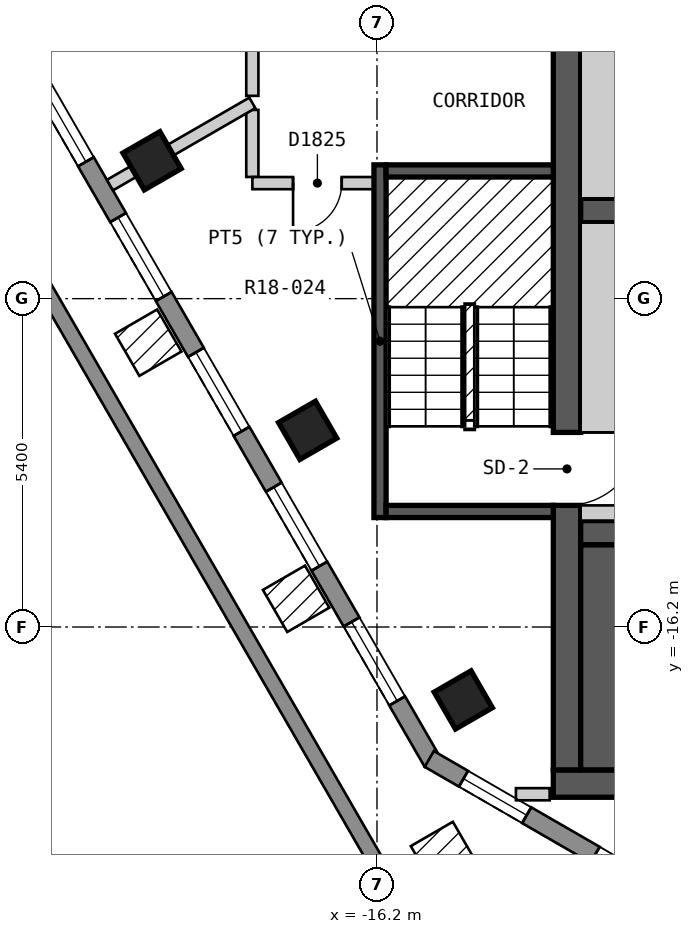
"""IFC4 building model, lengths in metres.
Left out: names, types, materials, properties, quantities, classifications, styles, units other than length and angle.
Written with IfcOpenShell. Run it as: python <this file> out.ifc"""

import sys

from ifc_helpers import new_model, si_unit, direction, frame, frame_2d, origin, origin_2d, place, context, subcontext, project, spatial, polyline, rectangle, outline, extrude, element, fill, save


model = new_model("IFC4")
c1 = context("Model", 3, precision=1e-05, world=origin(), true_north=direction((0.0, 1.0)))
c2 = subcontext(c1, "Body", "Model", "MODEL_VIEW")
j1 = project(units=[si_unit("LENGTHUNIT", "METRE"), si_unit("PLANEANGLEUNIT", "RADIAN")], contexts=[c1])
p1 = place(None, origin())
s1 = spatial("IfcSite", under=j1, at=p1, CompositionType="ELEMENT")
p2 = place(p1, origin())
s2 = spatial("IfcBuilding", under=s1, at=p2, CompositionType="ELEMENT")
p3 = place(p2, frame((0.0, 0.0, 202.8)))
s3 = spatial("IfcBuildingStorey", under=s2, at=p3, CompositionType="ELEMENT", Elevation=202.8)
for number, where, z_axis, x_axis in (
    (1, (-19.899, -8.533, 0.0), (0.0, 0.0, 1.0), (0.5, -0.866, 0.0)),
    (2, (-17.34, -12.966, 0.0), (0.0, 0.0, 1.0), (0.5, -0.866, 0.0)),
    (3, (-14.781, -17.399, 0.0), (0.0, 0.0, 1.0), (0.5, -0.866, 0.0)),
):
    element("IfcColumn", number, at=place(p3, frame(where, z_axis=z_axis, x_axis=x_axis)), inside=s3, PredefinedType="COLUMN", context=c2, shape_type="SweptSolid", body=[
        extrude(rectangle(XDim=0.7, YDim=0.7, at=origin_2d()), origin(), (0.0, 0.0, 1.0), 3.0),
    ])
p4 = place(p3, frame((-13.3, -18.775, 0.0), z_axis=(0.0, 0.0, 1.0), x_axis=(1.0, 0.0, 0.0)))
e4 = element("IfcWall", 4, at=p4, inside=s3, PredefinedType="SHEAR", context=c2, shape_type="SweptSolid", body=[
    extrude(rectangle(XDim=26.6, YDim=0.45, at=frame_2d((13.3, 0.0))), origin(), (0.0, 0.0, 1.0), 2.7),
])
p5 = place(p4, frame((9.8, 0.0, 0.0)))
e5 = element("IfcOpeningElement", 5, at=p5, cuts=e4, PredefinedType="OPENING", context=c2, shape_type="SweptSolid", body=[
    extrude(rectangle(XDim=0.9, YDim=2.1, at=frame_2d((0.45, 1.05))), frame((0.0, 0.235, 0.0), z_axis=(0.0, -1.0, 0.0), x_axis=(1.0, 0.0, 0.0)), (0.0, 0.0, 1.0), 0.47),
])
p6 = place(p3, frame((-13.075, -18.55, 0.0), z_axis=(0.0, 0.0, 1.0), x_axis=(0.0, 1.0, 0.0)))
e6 = element("IfcWall", 6, at=p6, inside=s3, PredefinedType="SHEAR", context=c2, shape_type="SweptSolid", body=[
    extrude(rectangle(XDim=13.1, YDim=0.45, at=frame_2d((6.55, 0.0))), origin(), (0.0, 0.0, 1.0), 2.7),
])
p7 = place(p6, frame((4.35, 0.0, 0.0)))
e7 = element("IfcOpeningElement", 7, at=p7, cuts=e6, PredefinedType="OPENING", context=c2, shape_type="SweptSolid", body=[
    extrude(rectangle(XDim=1.2, YDim=2.1, at=frame_2d((0.6, 1.05))), frame((0.0, 0.235, 0.0), z_axis=(0.0, -1.0, 0.0), x_axis=(1.0, 0.0, 0.0)), (0.0, 0.0, 1.0), 0.47),
])
p8 = place(p3, frame((-12.85, -14.65, 0.0), z_axis=(0.0, 0.0, 1.0), x_axis=(1.0, 0.0, 0.0)))
e8 = element("IfcWall", 8, at=p8, inside=s3, PredefinedType="SHEAR", context=c2, shape_type="SweptSolid", body=[
    extrude(rectangle(XDim=25.7, YDim=0.4, at=frame_2d((12.85, 0.0))), origin(), (0.0, 0.0, 1.0), 2.7),
])
p9 = place(p8, frame((2.05, 0.0, 0.0), z_axis=(0.0, 0.0, 1.0), x_axis=(-1.0, 0.0, 0.0)))
e9 = element("IfcOpeningElement", 9, at=p9, cuts=e8, PredefinedType="OPENING", context=c2, shape_type="SweptSolid", body=[
    extrude(rectangle(XDim=1.2, YDim=2.1, at=frame_2d((0.6, 1.05))), frame((0.0, 0.21, 0.0), z_axis=(0.0, -1.0, 0.0), x_axis=(1.0, 0.0, 0.0)), (0.0, 0.0, 1.0), 0.42),
])
p10 = place(p8, frame((24.9, 0.0, 0.0), z_axis=(0.0, 0.0, 1.0), x_axis=(-1.0, 0.0, 0.0)))
e10 = element("IfcOpeningElement", 10, at=p10, cuts=e8, PredefinedType="OPENING", context=c2, shape_type="SweptSolid", body=[
    extrude(rectangle(XDim=1.2, YDim=2.1, at=frame_2d((0.6, 1.05))), frame((0.0, 0.21, 0.0), z_axis=(0.0, -1.0, 0.0), x_axis=(1.0, 0.0, 0.0)), (0.0, 0.0, 1.0), 0.42),
])
p11 = place(p8, frame((7.95, 0.0, 0.0), z_axis=(0.0, 0.0, 1.0), x_axis=(-1.0, 0.0, 0.0)))
e11 = element("IfcOpeningElement", 11, at=p11, cuts=e8, PredefinedType="OPENING", context=c2, shape_type="SweptSolid", body=[
    extrude(rectangle(XDim=0.9, YDim=2.1, at=frame_2d((0.45, 1.05))), frame((0.0, 0.21, 0.0), z_axis=(0.0, -1.0, 0.0), x_axis=(1.0, 0.0, 0.0)), (0.0, 0.0, 1.0), 0.42),
])
p12 = place(p8, frame((10.0, 0.0, 0.0), z_axis=(0.0, 0.0, 1.0), x_axis=(-1.0, 0.0, 0.0)))
e12 = element("IfcOpeningElement", 12, at=p12, cuts=e8, PredefinedType="OPENING", context=c2, shape_type="SweptSolid", body=[
    extrude(rectangle(XDim=0.9, YDim=2.1, at=frame_2d((0.45, 1.05))), frame((0.0, 0.21, 0.0), z_axis=(0.0, -1.0, 0.0), x_axis=(1.0, 0.0, 0.0)), (0.0, 0.0, 1.0), 0.42),
])
p13 = place(p8, frame((12.3, 0.0, 0.0), z_axis=(0.0, 0.0, 1.0), x_axis=(-1.0, 0.0, 0.0)))
e13 = element("IfcOpeningElement", 13, at=p13, cuts=e8, PredefinedType="OPENING", context=c2, shape_type="SweptSolid", body=[
    extrude(rectangle(XDim=1.0, YDim=2.1, at=frame_2d((0.5, 1.05))), frame((0.0, 0.21, 0.0), z_axis=(0.0, -1.0, 0.0), x_axis=(1.0, 0.0, 0.0)), (0.0, 0.0, 1.0), 0.42),
])
p14 = place(p8, frame((14.5, 0.0, 0.0), z_axis=(0.0, 0.0, 1.0), x_axis=(-1.0, 0.0, 0.0)))
e14 = element("IfcOpeningElement", 14, at=p14, cuts=e8, PredefinedType="OPENING", context=c2, shape_type="SweptSolid", body=[
    extrude(rectangle(XDim=0.9, YDim=2.1, at=frame_2d((0.45, 1.05))), frame((0.0, 0.21, 0.0), z_axis=(0.0, -1.0, 0.0), x_axis=(1.0, 0.0, 0.0)), (0.0, 0.0, 1.0), 0.42),
])
p15 = place(p8, frame((16.5, 0.0, 0.0), z_axis=(0.0, 0.0, 1.0), x_axis=(-1.0, 0.0, 0.0)))
e15 = element("IfcOpeningElement", 15, at=p15, cuts=e8, PredefinedType="OPENING", context=c2, shape_type="SweptSolid", body=[
    extrude(rectangle(XDim=0.9, YDim=2.1, at=frame_2d((0.45, 1.05))), frame((0.0, 0.21, 0.0), z_axis=(0.0, -1.0, 0.0), x_axis=(1.0, 0.0, 0.0)), (0.0, 0.0, 1.0), 0.42),
])
p16 = place(p8, frame((18.65, 0.0, 0.0), z_axis=(0.0, 0.0, 1.0), x_axis=(-1.0, 0.0, 0.0)))
e16 = element("IfcOpeningElement", 16, at=p16, cuts=e8, PredefinedType="OPENING", context=c2, shape_type="SweptSolid", body=[
    extrude(rectangle(XDim=1.0, YDim=2.1, at=frame_2d((0.5, 1.05))), frame((0.0, 0.21, 0.0), z_axis=(0.0, -1.0, 0.0), x_axis=(1.0, 0.0, 0.0)), (0.0, 0.0, 1.0), 0.42),
])
p17 = place(p3, frame((-12.85, -9.35, 0.0), z_axis=(0.0, 0.0, 1.0), x_axis=(1.0, 0.0, 0.0)))
e17 = element("IfcWall", 17, at=p17, inside=s3, PredefinedType="SHEAR", context=c2, shape_type="SweptSolid", body=[
    extrude(rectangle(XDim=23.05, YDim=0.4, at=frame_2d((11.525, 0.0))), origin(), (0.0, 0.0, 1.0), 2.7),
])
p18 = place(p17, frame((1.45, 0.0, 0.0)))
e18 = element("IfcOpeningElement", 18, at=p18, cuts=e17, PredefinedType="OPENING", context=c2, shape_type="SweptSolid", body=[
    extrude(rectangle(XDim=1.1, YDim=2.1, at=frame_2d((0.55, 1.05))), frame((0.0, 0.21, 0.0), z_axis=(0.0, -1.0, 0.0), x_axis=(1.0, 0.0, 0.0)), (0.0, 0.0, 1.0), 0.42),
])
p19 = place(p17, frame((4.25, 0.0, 0.0)))
e19 = element("IfcOpeningElement", 19, at=p19, cuts=e17, PredefinedType="OPENING", context=c2, shape_type="SweptSolid", body=[
    extrude(rectangle(XDim=1.1, YDim=2.1, at=frame_2d((0.55, 1.05))), frame((0.0, 0.21, 0.0), z_axis=(0.0, -1.0, 0.0), x_axis=(1.0, 0.0, 0.0)), (0.0, 0.0, 1.0), 0.42),
])
p20 = place(p17, frame((7.05, 0.0, 0.0)))
e20 = element("IfcOpeningElement", 20, at=p20, cuts=e17, PredefinedType="OPENING", context=c2, shape_type="SweptSolid", body=[
    extrude(rectangle(XDim=1.1, YDim=2.1, at=frame_2d((0.55, 1.05))), frame((0.0, 0.21, 0.0), z_axis=(0.0, -1.0, 0.0), x_axis=(1.0, 0.0, 0.0)), (0.0, 0.0, 1.0), 0.42),
])
p21 = place(p17, frame((9.35, 0.0, 0.0)))
e21 = element("IfcOpeningElement", 21, at=p21, cuts=e17, PredefinedType="OPENING", context=c2, shape_type="SweptSolid", body=[
    extrude(rectangle(XDim=1.1, YDim=2.1, at=frame_2d((0.55, 1.05))), frame((0.0, 0.21, 0.0), z_axis=(0.0, -1.0, 0.0), x_axis=(1.0, 0.0, 0.0)), (0.0, 0.0, 1.0), 0.42),
])
p22 = place(p17, frame((11.65, 0.0, 0.0)))
e22 = element("IfcOpeningElement", 22, at=p22, cuts=e17, PredefinedType="OPENING", context=c2, shape_type="SweptSolid", body=[
    extrude(rectangle(XDim=1.1, YDim=2.1, at=frame_2d((0.55, 1.05))), frame((0.0, 0.21, 0.0), z_axis=(0.0, -1.0, 0.0), x_axis=(1.0, 0.0, 0.0)), (0.0, 0.0, 1.0), 0.42),
])
p23 = place(p17, frame((13.95, 0.0, 0.0)))
e23 = element("IfcOpeningElement", 23, at=p23, cuts=e17, PredefinedType="OPENING", context=c2, shape_type="SweptSolid", body=[
    extrude(rectangle(XDim=1.1, YDim=2.1, at=frame_2d((0.55, 1.05))), frame((0.0, 0.21, 0.0), z_axis=(0.0, -1.0, 0.0), x_axis=(1.0, 0.0, 0.0)), (0.0, 0.0, 1.0), 0.42),
])
p24 = place(p17, frame((16.25, 0.0, 0.0)))
e24 = element("IfcOpeningElement", 24, at=p24, cuts=e17, PredefinedType="OPENING", context=c2, shape_type="SweptSolid", body=[
    extrude(rectangle(XDim=1.1, YDim=2.1, at=frame_2d((0.55, 1.05))), frame((0.0, 0.21, 0.0), z_axis=(0.0, -1.0, 0.0), x_axis=(1.0, 0.0, 0.0)), (0.0, 0.0, 1.0), 0.42),
])
p25 = place(p17, frame((18.55, 0.0, 0.0)))
e25 = element("IfcOpeningElement", 25, at=p25, cuts=e17, PredefinedType="OPENING", context=c2, shape_type="SweptSolid", body=[
    extrude(rectangle(XDim=1.1, YDim=2.1, at=frame_2d((0.55, 1.05))), frame((0.0, 0.21, 0.0), z_axis=(0.0, -1.0, 0.0), x_axis=(1.0, 0.0, 0.0)), (0.0, 0.0, 1.0), 0.42),
])
p26 = place(p17, frame((20.95, 0.0, 0.0)))
e26 = element("IfcOpeningElement", 26, at=p26, cuts=e17, PredefinedType="OPENING", context=c2, shape_type="SweptSolid", body=[
    extrude(rectangle(XDim=1.1, YDim=2.1, at=frame_2d((0.55, 1.05))), frame((0.0, 0.21, 0.0), z_axis=(0.0, -1.0, 0.0), x_axis=(1.0, 0.0, 0.0)), (0.0, 0.0, 1.0), 0.42),
])
p27 = place(p3, frame((-23.599, -4.025, 0.0), z_axis=(0.0, 0.0, 1.0), x_axis=(0.500012653391, -0.866018098222, 0.0)))
e27 = element("IfcWall", 27, at=p27, inside=s3, PredefinedType="SOLIDWALL", context=c2, shape_type="SweptSolid", body=[
    extrude(outline(polyline([(0.0, -0.15), (16.628, -0.15), (16.548, 0.15), (0.08, 0.15), (0.0, -0.15)])), origin(), (0.0, 0.0, 1.0), 2.7),
])
p28 = place(p27, frame((1.164, 0.0, 0.15)))
e28 = element("IfcOpeningElement", 28, at=p28, cuts=e27, PredefinedType="OPENING", context=c2, shape_type="SweptSolid", body=[
    extrude(rectangle(XDim=1.5, YDim=2.1, at=frame_2d((0.75, 1.05))), frame((0.0, 0.16, 0.0), z_axis=(0.0, -1.0, 0.0), x_axis=(1.0, 0.0, 0.0)), (0.0, 0.0, 1.0), 0.32),
])
p29 = place(p27, frame((3.724, 0.0, 0.15)))
e29 = element("IfcOpeningElement", 29, at=p29, cuts=e27, PredefinedType="OPENING", context=c2, shape_type="SweptSolid", body=[
    extrude(rectangle(XDim=1.5, YDim=2.1, at=frame_2d((0.75, 1.05))), frame((0.0, 0.16, 0.0), z_axis=(0.0, -1.0, 0.0), x_axis=(1.0, 0.0, 0.0)), (0.0, 0.0, 1.0), 0.32),
])
p30 = place(p27, frame((6.283, 0.0, 0.15)))
e30 = element("IfcOpeningElement", 30, at=p30, cuts=e27, PredefinedType="OPENING", context=c2, shape_type="SweptSolid", body=[
    extrude(rectangle(XDim=1.5, YDim=2.1, at=frame_2d((0.75, 1.05))), frame((0.0, 0.16, 0.0), z_axis=(0.0, -1.0, 0.0), x_axis=(1.0, 0.0, 0.0)), (0.0, 0.0, 1.0), 0.32),
])
p31 = place(p27, frame((8.843, 0.0, 0.15)))
e31 = element("IfcOpeningElement", 31, at=p31, cuts=e27, PredefinedType="OPENING", context=c2, shape_type="SweptSolid", body=[
    extrude(rectangle(XDim=1.5, YDim=2.1, at=frame_2d((0.75, 1.05))), frame((0.0, 0.16, 0.0), z_axis=(0.0, -1.0, 0.0), x_axis=(1.0, 0.0, 0.0)), (0.0, 0.0, 1.0), 0.32),
])
p32 = place(p27, frame((11.403, 0.0, 0.15)))
e32 = element("IfcOpeningElement", 32, at=p32, cuts=e27, PredefinedType="OPENING", context=c2, shape_type="SweptSolid", body=[
    extrude(rectangle(XDim=1.5, YDim=2.1, at=frame_2d((0.75, 1.05))), frame((0.0, 0.16, 0.0), z_axis=(0.0, -1.0, 0.0), x_axis=(1.0, 0.0, 0.0)), (0.0, 0.0, 1.0), 0.32),
])
p33 = place(p27, frame((13.962, 0.0, 0.15)))
e33 = element("IfcOpeningElement", 33, at=p33, cuts=e27, PredefinedType="OPENING", context=c2, shape_type="SweptSolid", body=[
    extrude(rectangle(XDim=1.5, YDim=2.1, at=frame_2d((0.75, 1.05))), frame((0.0, 0.16, 0.0), z_axis=(0.0, -1.0, 0.0), x_axis=(1.0, 0.0, 0.0)), (0.0, 0.0, 1.0), 0.32),
])
p34 = place(p3, frame((-15.34, -18.37, 0.0), z_axis=(0.0, 0.0, 1.0), x_axis=(0.866022959057, -0.500004234368, 0.0)))
e34 = element("IfcWall", 34, at=p34, inside=s3, PredefinedType="SOLIDWALL", context=c2, shape_type="SweptSolid", body=[
    extrude(outline(polyline([(0.0, -0.15), (5.0, -0.15), (4.92, 0.15), (0.08, 0.15), (0.0, -0.15)])), origin(), (0.0, 0.0, 1.0), 2.7),
])
p35 = place(p34, frame((0.65, 0.0, 0.15)))
e35 = element("IfcOpeningElement", 35, at=p35, cuts=e34, PredefinedType="OPENING", context=c2, shape_type="SweptSolid", body=[
    extrude(rectangle(XDim=1.2, YDim=2.1, at=frame_2d((0.6, 1.05))), frame((0.0, 0.16, 0.0), z_axis=(0.0, -1.0, 0.0), x_axis=(1.0, 0.0, 0.0)), (0.0, 0.0, 1.0), 0.32),
])
p36 = place(p34, frame((3.15, 0.0, 0.15)))
e36 = element("IfcOpeningElement", 36, at=p36, cuts=e34, PredefinedType="OPENING", context=c2, shape_type="SweptSolid", body=[
    extrude(rectangle(XDim=1.2, YDim=2.1, at=frame_2d((0.6, 1.05))), frame((0.0, 0.16, 0.0), z_axis=(0.0, -1.0, 0.0), x_axis=(1.0, 0.0, 0.0)), (0.0, 0.0, 1.0), 0.32),
])
p37 = place(p3, frame((-15.652, -21.037, 0.0), z_axis=(0.0, 0.0, 1.0), x_axis=(-0.500074253024, 0.865982529536, 0.0)))
e37 = element("IfcWall", 37, at=p37, inside=s3, PredefinedType="PARAPET", context=c2, shape_type="SweptSolid", body=[
    extrude(outline(polyline([(0.067, -0.125), (20.718, -0.125), (20.784, 0.125), (0.0, 0.125), (0.067, -0.125)])), origin(), (0.0, 0.0, 1.0), 1.6),
])
p38 = place(p3, frame((-18.25, -7.696, 0.0), z_axis=(0.0, 0.0, 1.0), x_axis=(0.0, -1.0, 0.0)))
e38 = element("IfcWall", 38, at=p38, inside=s3, PredefinedType="PARTITIONING", context=c2, shape_type="SweptSolid", body=[
    extrude(rectangle(XDim=1.103, YDim=0.2, at=frame_2d((0.552, 0.0))), origin(), (0.0, 0.0, 1.0), 2.7),
])
p39 = place(p3, frame((-18.249, -8.9, 0.0), z_axis=(0.0, 0.0, 1.0), x_axis=(1.0, 0.0, 0.0)))
e39 = element("IfcWall", 39, at=p39, inside=s3, PredefinedType="PARTITIONING", context=c2, shape_type="SweptSolid", body=[
    extrude(rectangle(XDim=2.199, YDim=0.2, at=frame_2d((1.1, 0.0))), origin(), (0.0, 0.0, 1.0), 2.7),
])
p40 = place(p39, frame((0.669, 0.0, 0.0)))
e40 = element("IfcOpeningElement", 40, at=p40, cuts=e39, PredefinedType="OPENING", context=c2, shape_type="SweptSolid", body=[
    extrude(rectangle(XDim=0.8, YDim=2.1, at=frame_2d((0.4, 1.05))), frame((0.0, 0.11, 0.0), z_axis=(0.0, -1.0, 0.0), x_axis=(1.0, 0.0, 0.0)), (0.0, 0.0, 1.0), 0.22),
])
p41 = place(p3, frame((-18.25, -7.465, 0.0), z_axis=(0.0, 0.0, 1.0), x_axis=(0.0, 1.0, 0.0)))
e41 = element("IfcWall", 41, at=p41, inside=s3, PredefinedType="PARTITIONING", context=c2, shape_type="SweptSolid", body=[
    extrude(rectangle(XDim=0.864, YDim=0.2, at=frame_2d((0.432, 0.0))), origin(), (0.0, 0.0, 1.0), 2.7),
])
p42 = place(p3, frame((-13.915, -18.95, 0.0), z_axis=(0.0, 0.0, 1.0), x_axis=(1.0, 0.0, 0.0)))
e42 = element("IfcWall", 42, at=p42, inside=s3, PredefinedType="PARTITIONING", context=c2, shape_type="SweptSolid", body=[
    extrude(rectangle(XDim=0.555, YDim=0.2, at=frame_2d((0.277, 0.0))), origin(), (0.0, 0.0, 1.0), 2.7),
])
p43 = place(p3, frame((-20.592, -8.933, 0.0), z_axis=(0.0, 0.0, 1.0), x_axis=(0.866045775131, 0.499964714133, 0.0)))
e43 = element("IfcWall", 43, at=p43, inside=s3, PredefinedType="PARTITIONING", context=c2, shape_type="SweptSolid", body=[
    extrude(rectangle(XDim=2.704, YDim=0.2, at=frame_2d((1.352, 0.0))), origin(), (0.0, 0.0, 1.0), 2.7),
])
p44 = place(p3, frame((-16.15, -14.4, 0.0), z_axis=(0.0, 0.0, 1.0), x_axis=(0.0, 1.0, 0.0)))
e44 = element("IfcWall", 44, at=p44, inside=s3, PredefinedType="SOLIDWALL", context=c2, shape_type="SweptSolid", body=[
    extrude(rectangle(XDim=5.8, YDim=0.2, at=frame_2d((2.9, 0.0))), origin(), (0.0, 0.0, 1.0), 2.7),
])
for number, where, z_axis, x_axis in (
    (45, (-16.05, -14.3, 0.0), (0.0, 0.0, 1.0), (1.0, 0.0, 0.0)),
    (46, (-16.05, -8.7, 0.0), (0.0, 0.0, 1.0), (1.0, 0.0, 0.0)),
):
    element("IfcWall", number, at=place(p3, frame(where, z_axis=z_axis, x_axis=x_axis)), inside=s3, PredefinedType="SOLIDWALL", context=c2, shape_type="SweptSolid", body=[
        extrude(rectangle(XDim=2.75, YDim=0.2, at=frame_2d((1.375, 0.0))), origin(), (0.0, 0.0, 1.0), 2.7),
    ])
p45 = place(p3, frame((-12.475, -18.55, 0.0), z_axis=(0.0, 0.0, 1.0), x_axis=(0.0, 1.0, 0.0)))
e47 = element("IfcWall", 47, at=p45, inside=s3, PredefinedType="SOLIDWALL", context=c2, shape_type="SweptSolid", body=[
    extrude(rectangle(XDim=3.7, YDim=0.75, at=frame_2d((1.85, 0.0))), origin(), (0.0, 0.0, 1.0), 2.7),
])
p46 = place(p3, frame((-12.85, -14.325, 0.0), z_axis=(0.0, 0.0, 1.0), x_axis=(1.0, 0.0, 0.0)))
e48 = element("IfcWall", 48, at=p46, inside=s3, PredefinedType="PARTITIONING", context=c2, shape_type="SweptSolid", body=[
    extrude(rectangle(XDim=0.75, YDim=0.25, at=frame_2d((0.375, 0.0))), origin(), (0.0, 0.0, 1.0), 2.7),
])
p47 = place(p3, frame((-12.475, -13.0, 0.0), z_axis=(0.0, 0.0, 1.0), x_axis=(0.0, 1.0, 0.0)))
e49 = element("IfcWall", 49, at=p47, inside=s3, PredefinedType="PARTITIONING", context=c2, shape_type="SweptSolid", body=[
    extrude(rectangle(XDim=3.45, YDim=0.75, at=frame_2d((1.725, 0.0))), origin(), (0.0, 0.0, 1.0), 2.7),
])
p48 = place(p3, frame((-12.475, -9.15, 0.0), z_axis=(0.0, 0.0, 1.0), x_axis=(0.0, 1.0, 0.0)))
e50 = element("IfcWall", 50, at=p48, inside=s3, PredefinedType="SOLIDWALL", context=c2, shape_type="SweptSolid", body=[
    extrude(rectangle(XDim=3.7, YDim=0.75, at=frame_2d((1.85, 0.0))), origin(), (0.0, 0.0, 1.0), 2.7),
])
p49 = place(p29, origin())
e51 = element("IfcWindow", 51, at=p49, inside=s3, PartitioningType="SINGLE_PANEL", PredefinedType="WINDOW", context=c2, shape_type="SweptSolid", body=[
    extrude(rectangle(XDim=1.5, YDim=2.1, at=frame_2d((0.75, 1.05))), frame((0.0, 0.03, 0.0), z_axis=(0.0, -1.0, 0.0), x_axis=(1.0, 0.0, 0.0)), (0.0, 0.0, 1.0), 0.06),
])
fill(e29, e51)
p50 = place(p30, origin())
e52 = element("IfcWindow", 52, at=p50, inside=s3, PartitioningType="SINGLE_PANEL", PredefinedType="WINDOW", context=c2, shape_type="SweptSolid", body=[
    extrude(rectangle(XDim=1.5, YDim=2.1, at=frame_2d((0.75, 1.05))), frame((0.0, 0.03, 0.0), z_axis=(0.0, -1.0, 0.0), x_axis=(1.0, 0.0, 0.0)), (0.0, 0.0, 1.0), 0.06),
])
fill(e30, e52)
p51 = place(p31, origin())
e53 = element("IfcWindow", 53, at=p51, inside=s3, PartitioningType="SINGLE_PANEL", PredefinedType="WINDOW", context=c2, shape_type="SweptSolid", body=[
    extrude(rectangle(XDim=1.5, YDim=2.1, at=frame_2d((0.75, 1.05))), frame((0.0, 0.03, 0.0), z_axis=(0.0, -1.0, 0.0), x_axis=(1.0, 0.0, 0.0)), (0.0, 0.0, 1.0), 0.06),
])
fill(e31, e53)
p52 = place(p32, origin())
e54 = element("IfcWindow", 54, at=p52, inside=s3, PartitioningType="SINGLE_PANEL", PredefinedType="WINDOW", context=c2, shape_type="SweptSolid", body=[
    extrude(rectangle(XDim=1.5, YDim=2.1, at=frame_2d((0.75, 1.05))), frame((0.0, 0.03, 0.0), z_axis=(0.0, -1.0, 0.0), x_axis=(1.0, 0.0, 0.0)), (0.0, 0.0, 1.0), 0.06),
])
fill(e32, e54)
p53 = place(p33, origin())
e55 = element("IfcWindow", 55, at=p53, inside=s3, PartitioningType="SINGLE_PANEL", PredefinedType="WINDOW", context=c2, shape_type="SweptSolid", body=[
    extrude(rectangle(XDim=1.5, YDim=2.1, at=frame_2d((0.75, 1.05))), frame((0.0, 0.03, 0.0), z_axis=(0.0, -1.0, 0.0), x_axis=(1.0, 0.0, 0.0)), (0.0, 0.0, 1.0), 0.06),
])
fill(e33, e55)
p54 = place(p35, origin())
e56 = element("IfcWindow", 56, at=p54, inside=s3, PartitioningType="SINGLE_PANEL", PredefinedType="WINDOW", context=c2, shape_type="SweptSolid", body=[
    extrude(rectangle(XDim=1.2, YDim=2.1, at=frame_2d((0.6, 1.05))), frame((0.0, 0.03, 0.0), z_axis=(0.0, -1.0, 0.0), x_axis=(1.0, 0.0, 0.0)), (0.0, 0.0, 1.0), 0.06),
])
fill(e35, e56)
p55 = place(p36, origin())
e57 = element("IfcWindow", 57, at=p55, inside=s3, PartitioningType="SINGLE_PANEL", PredefinedType="WINDOW", context=c2, shape_type="SweptSolid", body=[
    extrude(rectangle(XDim=1.2, YDim=2.1, at=frame_2d((0.6, 1.05))), frame((0.0, 0.03, 0.0), z_axis=(0.0, -1.0, 0.0), x_axis=(1.0, 0.0, 0.0)), (0.0, 0.0, 1.0), 0.06),
])
fill(e36, e57)
p56 = place(p40, origin())
e58 = element("IfcDoor", 58, at=p56, inside=s3, OperationType="SINGLE_SWING_LEFT", PredefinedType="DOOR", context=c2, shape_type="SweptSolid", body=[
    extrude(rectangle(XDim=0.8, YDim=2.1, at=frame_2d((0.4, 1.05))), frame((0.0, 0.025, 0.0), z_axis=(0.0, -1.0, 0.0), x_axis=(1.0, 0.0, 0.0)), (0.0, 0.0, 1.0), 0.05),
])
fill(e40, e58)
p57 = place(p7, origin())
e59 = element("IfcDoor", 59, at=p57, inside=s3, OperationType="SINGLE_SWING_RIGHT", PredefinedType="DOOR", context=c2, shape_type="SweptSolid", body=[
    extrude(rectangle(XDim=1.2, YDim=2.1, at=frame_2d((0.6, 1.05))), frame((0.0, 0.025, 0.0), z_axis=(0.0, -1.0, 0.0), x_axis=(1.0, 0.0, 0.0)), (0.0, 0.0, 1.0), 0.05),
])
fill(e7, e59)
save(model, sys.argv[1])
